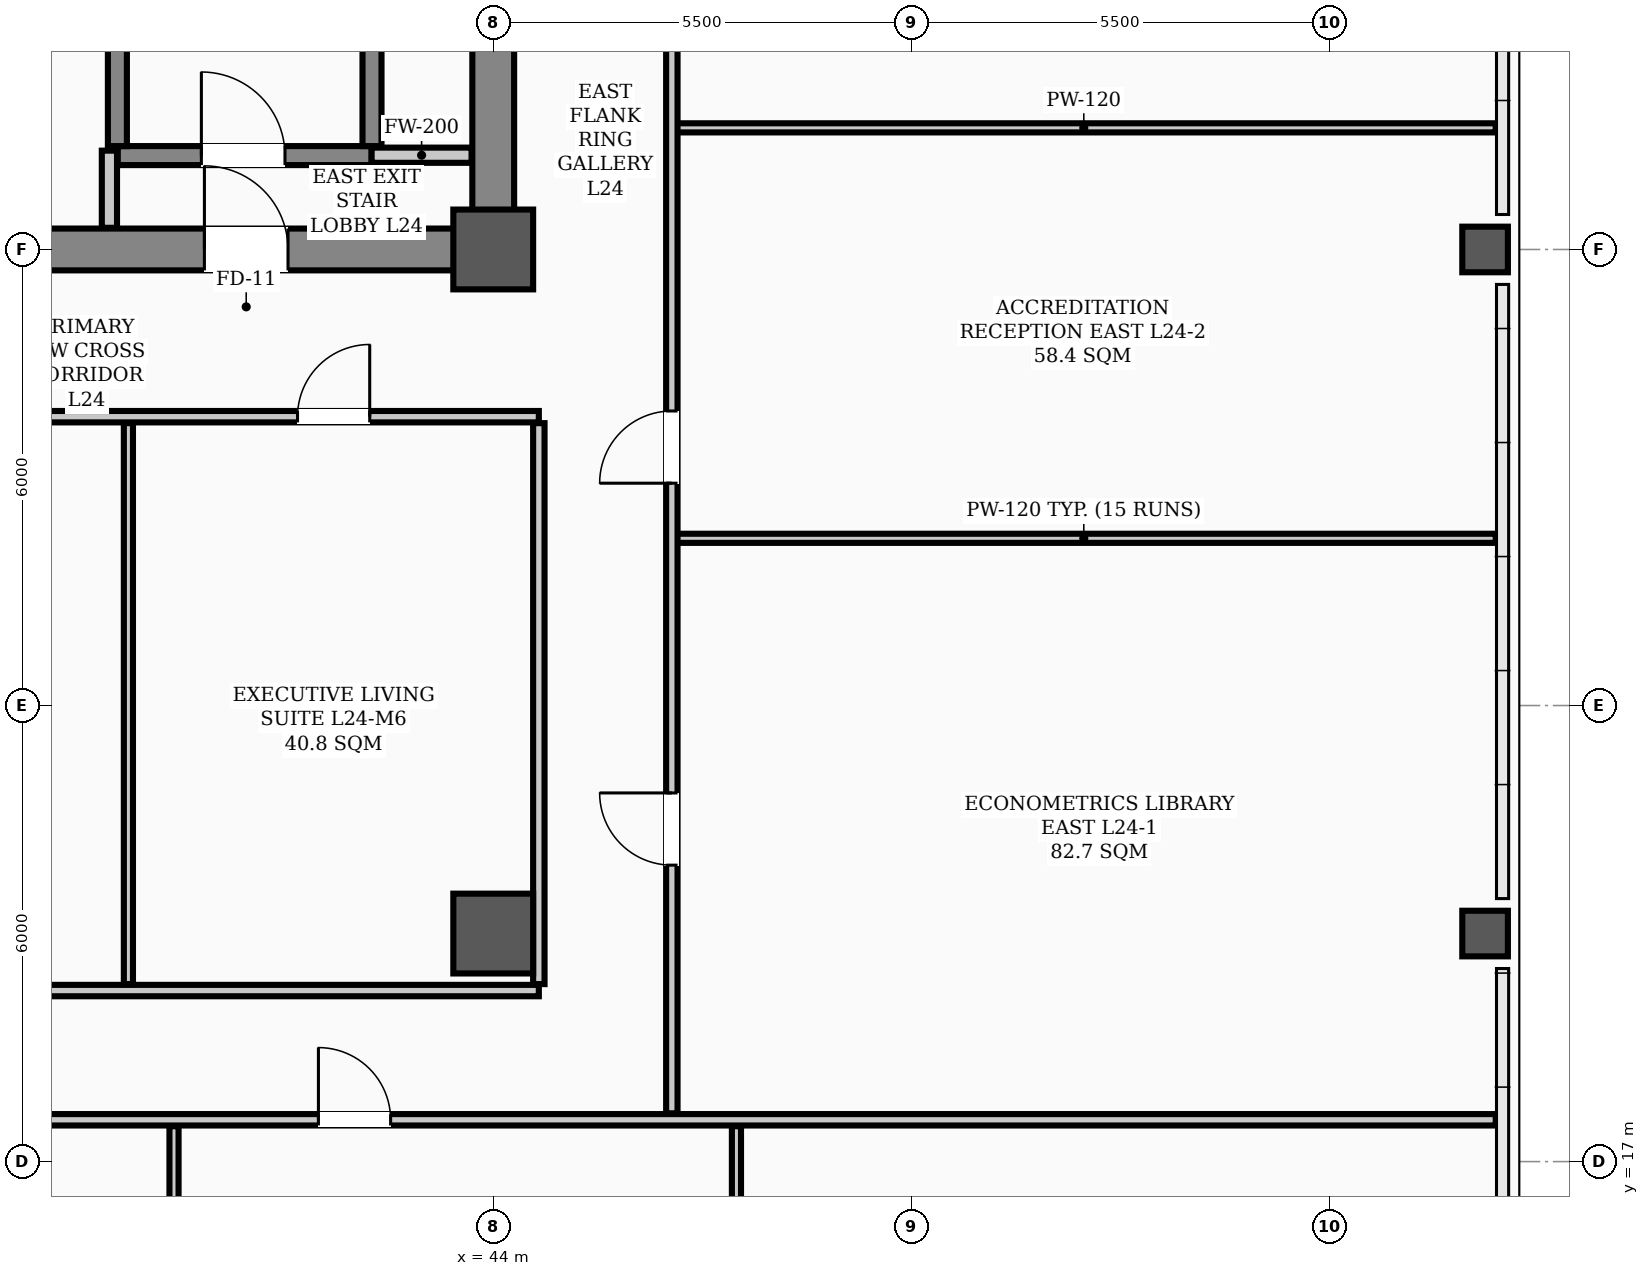
"""IFC4 building model, lengths in metres.
Left out: names, types, materials, properties, quantities, classifications, styles, units other than length and angle.
Written with IfcOpenShell. Run it as: python <this file> out.ifc"""

import sys

from ifc_helpers import new_model, si_unit, direction, frame, frame_2d, origin, origin_2d, place, context, subcontext, project, spatial, rectangle, hollow_rectangle, extrude, element, fill, save


model = new_model("IFC4")
c1 = context("Model", 3, precision=1e-05, world=origin(), true_north=direction((0.0, 1.0)))
c2 = subcontext(c1, "Body", "Model", "MODEL_VIEW")
j1 = project(units=[si_unit("LENGTHUNIT", "METRE"), si_unit("PLANEANGLEUNIT", "RADIAN")], contexts=[c1])
p1 = place(None, origin())
s1 = spatial("IfcSite", under=j1, at=p1, CompositionType="ELEMENT")
p2 = place(p1, origin())
s2 = spatial("IfcBuilding", under=s1, at=p2, CompositionType="ELEMENT")
p3 = place(p2, frame((0.0, 0.0, 96.7)))
s3 = spatial("IfcBuildingStorey", under=s2, at=p3, CompositionType="ELEMENT", Elevation=96.7)
for number, where, z_axis, x_axis in (
    (1, (44.0, 29.0, 0.0), (0.0, 0.0, 1.0), (1.0, 0.0, 0.0)),
    (2, (44.0, 20.0, 0.0), (0.0, 0.0, 1.0), (1.0, 0.0, 0.0)),
):
    element("IfcColumn", number, at=place(p3, frame(where, z_axis=z_axis, x_axis=x_axis)), inside=s3, PredefinedType="COLUMN", context=c2, shape_type="SweptSolid", body=[
        extrude(hollow_rectangle(XDim=1.05, YDim=1.05, WallThickness=0.038, InnerFilletRadius=0.019, OuterFilletRadius=0.057, at=origin_2d()), origin(), (0.0, 0.0, 1.0), 3.9),
    ])
for number, where, z_axis, x_axis in (
    (3, (57.05, 20.0, 0.0), (0.0, 0.0, 1.0), (1.0, 0.0, 0.0)),
    (4, (57.05, 29.0, 0.0), (0.0, 0.0, 1.0), (1.0, 0.0, 0.0)),
):
    element("IfcColumn", number, at=place(p3, frame(where, z_axis=z_axis, x_axis=x_axis)), inside=s3, PredefinedType="COLUMN", context=c2, shape_type="SweptSolid", body=[
        extrude(hollow_rectangle(XDim=0.6, YDim=0.6, WallThickness=0.026, InnerFilletRadius=0.013, OuterFilletRadius=0.039, at=origin_2d()), origin(), (0.0, 0.0, 1.0), 3.9),
    ])
p4 = place(p3, frame((13.5, 29.0, 0.0), z_axis=(0.0, 0.0, 1.0), x_axis=(1.0, 0.0, 0.0)))
e5 = element("IfcWall", 5, at=p4, inside=s3, PredefinedType="SHEAR", context=c2, shape_type="SweptSolid", body=[
    extrude(rectangle(XDim=30.5, YDim=0.55, at=frame_2d((15.25, 0.0))), origin(), (0.0, 0.0, 1.0), 3.6),
])
p5 = place(p4, frame((1.75, 0.0, 0.0)))
e6 = element("IfcOpeningElement", 6, at=p5, cuts=e5, PredefinedType="OPENING", context=c2, shape_type="SweptSolid", body=[
    extrude(rectangle(XDim=1.1, YDim=2.08, at=frame_2d((0.55, 1.04))), frame((0.0, 0.285, 0.0), z_axis=(0.0, -1.0, 0.0), x_axis=(1.0, 0.0, 0.0)), (0.0, 0.0, 1.0), 0.57),
])
p6 = place(p4, frame((26.7, 0.0, 0.0)))
e7 = element("IfcOpeningElement", 7, at=p6, cuts=e5, PredefinedType="OPENING", context=c2, shape_type="SweptSolid", body=[
    extrude(rectangle(XDim=1.1, YDim=2.08, at=frame_2d((0.55, 1.04))), frame((0.0, 0.285, 0.0), z_axis=(0.0, -1.0, 0.0), x_axis=(1.0, 0.0, 0.0)), (0.0, 0.0, 1.0), 0.57),
])
p7 = place(p4, frame((6.8, 0.0, 0.0)))
e8 = element("IfcOpeningElement", 8, at=p7, cuts=e5, PredefinedType="OPENING", context=c2, shape_type="SweptSolid", body=[
    extrude(rectangle(XDim=1.1, YDim=2.08, at=frame_2d((0.55, 1.04))), frame((0.0, 0.285, 0.0), z_axis=(0.0, -1.0, 0.0), x_axis=(1.0, 0.0, 0.0)), (0.0, 0.0, 1.0), 0.57),
])
p8 = place(p4, frame((13.2, 0.0, 0.0)))
e9 = element("IfcOpeningElement", 9, at=p8, cuts=e5, PredefinedType="OPENING", context=c2, shape_type="SweptSolid", body=[
    extrude(rectangle(XDim=1.6, YDim=2.08, at=frame_2d((0.8, 1.04))), frame((0.0, 0.285, 0.0), z_axis=(0.0, -1.0, 0.0), x_axis=(1.0, 0.0, 0.0)), (0.0, 0.0, 1.0), 0.57),
])
p9 = place(p4, frame((19.53, 0.0, 0.0)))
e10 = element("IfcOpeningElement", 10, at=p9, cuts=e5, PredefinedType="OPENING", context=c2, shape_type="SweptSolid", body=[
    extrude(rectangle(XDim=0.9, YDim=2.08, at=frame_2d((0.45, 1.04))), frame((0.0, 0.285, 0.0), z_axis=(0.0, -1.0, 0.0), x_axis=(1.0, 0.0, 0.0)), (0.0, 0.0, 1.0), 0.57),
])
p10 = place(p4, frame((21.57, 0.0, 0.0)))
e11 = element("IfcOpeningElement", 11, at=p10, cuts=e5, PredefinedType="OPENING", context=c2, shape_type="SweptSolid", body=[
    extrude(rectangle(XDim=0.9, YDim=2.08, at=frame_2d((0.45, 1.04))), frame((0.0, 0.285, 0.0), z_axis=(0.0, -1.0, 0.0), x_axis=(1.0, 0.0, 0.0)), (0.0, 0.0, 1.0), 0.57),
])
p11 = place(p3, frame((44.0, 29.35, 0.0), z_axis=(0.0, 0.0, 1.0), x_axis=(0.0, 1.0, 0.0)))
e12 = element("IfcWall", 12, at=p11, inside=s3, PredefinedType="SHEAR", context=c2, shape_type="SweptSolid", body=[
    extrude(rectangle(XDim=8.6, YDim=0.55, at=frame_2d((4.3, 0.0))), origin(), (0.0, 0.0, 1.0), 3.6),
])
p12 = place(p3, frame((39.06, 30.235, 0.0), z_axis=(0.0, 0.0, 1.0), x_axis=(1.0, 0.0, 0.0)))
e13 = element("IfcWall", 13, at=p12, inside=s3, PredefinedType="STANDARD", context=c2, shape_type="SweptSolid", body=[
    extrude(rectangle(XDim=3.34, YDim=0.25, at=frame_2d((1.67, 0.0))), origin(), (0.0, 0.0, 1.0), 3.6),
])
p13 = place(p12, frame((1.1, 0.0, 0.0)))
e14 = element("IfcOpeningElement", 14, at=p13, cuts=e13, PredefinedType="OPENING", context=c2, shape_type="SweptSolid", body=[
    extrude(rectangle(XDim=1.1, YDim=2.08, at=frame_2d((0.55, 1.04))), frame((0.0, 0.135, 0.0), z_axis=(0.0, -1.0, 0.0), x_axis=(1.0, 0.0, 0.0)), (0.0, 0.0, 1.0), 0.27),
])
for number, where, z_axis, x_axis in (
    (15, (39.055, 30.36, 0.0), (0.0, 0.0, 1.0), (0.0, 1.0, 0.0)),
    (16, (42.405, 30.36, 0.0), (0.0, 0.0, 1.0), (0.0, 1.0, 0.0)),
):
    element("IfcWall", number, at=place(p3, frame(where, z_axis=z_axis, x_axis=x_axis)), inside=s3, PredefinedType="STANDARD", context=c2, shape_type="SweptSolid", body=[
        extrude(rectangle(XDim=7.184, YDim=0.25, at=frame_2d((3.592, 0.0))), origin(), (0.0, 0.0, 1.0), 3.6),
    ])
p14 = place(p3, frame((42.4, 30.24, 0.0), z_axis=(0.0, 0.0, 1.0), x_axis=(1.0, 0.0, 0.0)))
e17 = element("IfcWall", 17, at=p14, inside=s3, PredefinedType="STANDARD", context=c2, shape_type="SweptSolid", body=[
    extrude(rectangle(XDim=1.315, YDim=0.2, at=frame_2d((0.658, 0.0))), origin(), (0.0, 0.0, 1.0), 2.18),
])
p15 = place(p3, frame((12.9, 26.8, 0.0), z_axis=(0.0, 0.0, 1.0), x_axis=(1.0, 0.0, 0.0)))
e18 = element("IfcWall", 18, at=p15, inside=s3, PredefinedType="PARTITIONING", context=c2, shape_type="SweptSolid", body=[
    extrude(rectangle(XDim=31.7, YDim=0.15, at=frame_2d((15.85, 0.0))), origin(), (0.0, 0.0, 1.0), 2.18),
])
p16 = place(p15, frame((13.6, 0.0, 0.0)))
e19 = element("IfcOpeningElement", 19, at=p16, cuts=e18, PredefinedType="OPENING", context=c2, shape_type="SweptSolid", body=[
    extrude(rectangle(XDim=1.6, YDim=2.08, at=frame_2d((0.8, 1.04))), frame((0.0, 0.085, 0.0), z_axis=(0.0, -1.0, 0.0), x_axis=(1.0, 0.0, 0.0)), (0.0, 0.0, 1.0), 0.17),
])
p17 = place(p15, frame((2.075, 0.0, 0.0)))
e20 = element("IfcOpeningElement", 20, at=p17, cuts=e18, PredefinedType="OPENING", context=c2, shape_type="SweptSolid", body=[
    extrude(rectangle(XDim=0.95, YDim=2.08, at=frame_2d((0.475, 1.04))), frame((0.0, 0.085, 0.0), z_axis=(0.0, -1.0, 0.0), x_axis=(1.0, 0.0, 0.0)), (0.0, 0.0, 1.0), 0.17),
])
p18 = place(p15, frame((6.925, 0.0, 0.0)))
e21 = element("IfcOpeningElement", 21, at=p18, cuts=e18, PredefinedType="OPENING", context=c2, shape_type="SweptSolid", body=[
    extrude(rectangle(XDim=0.95, YDim=2.08, at=frame_2d((0.475, 1.04))), frame((0.0, 0.085, 0.0), z_axis=(0.0, -1.0, 0.0), x_axis=(1.0, 0.0, 0.0)), (0.0, 0.0, 1.0), 0.17),
])
p19 = place(p15, frame((11.025, 0.0, 0.0)))
e22 = element("IfcOpeningElement", 22, at=p19, cuts=e18, PredefinedType="OPENING", context=c2, shape_type="SweptSolid", body=[
    extrude(rectangle(XDim=0.95, YDim=2.08, at=frame_2d((0.475, 1.04))), frame((0.0, 0.085, 0.0), z_axis=(0.0, -1.0, 0.0), x_axis=(1.0, 0.0, 0.0)), (0.0, 0.0, 1.0), 0.17),
])
p20 = place(p15, frame((16.075, 0.0, 0.0)))
e23 = element("IfcOpeningElement", 23, at=p20, cuts=e18, PredefinedType="OPENING", context=c2, shape_type="SweptSolid", body=[
    extrude(rectangle(XDim=0.95, YDim=2.08, at=frame_2d((0.475, 1.04))), frame((0.0, 0.085, 0.0), z_axis=(0.0, -1.0, 0.0), x_axis=(1.0, 0.0, 0.0)), (0.0, 0.0, 1.0), 0.17),
])
p21 = place(p15, frame((22.025, 0.0, 0.0)))
e24 = element("IfcOpeningElement", 24, at=p21, cuts=e18, PredefinedType="OPENING", context=c2, shape_type="SweptSolid", body=[
    extrude(rectangle(XDim=0.95, YDim=2.08, at=frame_2d((0.475, 1.04))), frame((0.0, 0.085, 0.0), z_axis=(0.0, -1.0, 0.0), x_axis=(1.0, 0.0, 0.0)), (0.0, 0.0, 1.0), 0.17),
])
p22 = place(p15, frame((28.525, 0.0, 0.0)))
e25 = element("IfcOpeningElement", 25, at=p22, cuts=e18, PredefinedType="OPENING", context=c2, shape_type="SweptSolid", body=[
    extrude(rectangle(XDim=0.95, YDim=2.08, at=frame_2d((0.475, 1.04))), frame((0.0, 0.085, 0.0), z_axis=(0.0, -1.0, 0.0), x_axis=(1.0, 0.0, 0.0)), (0.0, 0.0, 1.0), 0.17),
])
p23 = place(p3, frame((7.81, 17.55, 0.0), z_axis=(0.0, 0.0, 1.0), x_axis=(1.0, 0.0, 0.0)))
e26 = element("IfcWall", 26, at=p23, inside=s3, PredefinedType="PARTITIONING", context=c2, shape_type="SweptSolid", body=[
    extrude(rectangle(XDim=49.38, YDim=0.15, at=frame_2d((24.69, 0.0))), origin(), (0.0, 0.0, 1.0), 2.18),
])
p24 = place(p23, frame((3.59, 0.0, 0.0)))
e27 = element("IfcOpeningElement", 27, at=p24, cuts=e26, PredefinedType="OPENING", context=c2, shape_type="SweptSolid", body=[
    extrude(rectangle(XDim=0.95, YDim=2.08, at=frame_2d((0.475, 1.04))), frame((0.0, 0.085, 0.0), z_axis=(0.0, -1.0, 0.0), x_axis=(1.0, 0.0, 0.0)), (0.0, 0.0, 1.0), 0.17),
])
p25 = place(p23, frame((10.115, 0.0, 0.0)))
e28 = element("IfcOpeningElement", 28, at=p25, cuts=e26, PredefinedType="OPENING", context=c2, shape_type="SweptSolid", body=[
    extrude(rectangle(XDim=0.95, YDim=2.08, at=frame_2d((0.475, 1.04))), frame((0.0, 0.085, 0.0), z_axis=(0.0, -1.0, 0.0), x_axis=(1.0, 0.0, 0.0)), (0.0, 0.0, 1.0), 0.17),
])
p26 = place(p23, frame((18.615, 0.0, 0.0)))
e29 = element("IfcOpeningElement", 29, at=p26, cuts=e26, PredefinedType="OPENING", context=c2, shape_type="SweptSolid", body=[
    extrude(rectangle(XDim=0.95, YDim=2.08, at=frame_2d((0.475, 1.04))), frame((0.0, 0.085, 0.0), z_axis=(0.0, -1.0, 0.0), x_axis=(1.0, 0.0, 0.0)), (0.0, 0.0, 1.0), 0.17),
])
p27 = place(p23, frame((27.315, 0.0, 0.0)))
e30 = element("IfcOpeningElement", 30, at=p27, cuts=e26, PredefinedType="OPENING", context=c2, shape_type="SweptSolid", body=[
    extrude(rectangle(XDim=0.95, YDim=2.08, at=frame_2d((0.475, 1.04))), frame((0.0, 0.085, 0.0), z_axis=(0.0, -1.0, 0.0), x_axis=(1.0, 0.0, 0.0)), (0.0, 0.0, 1.0), 0.17),
])
p28 = place(p23, frame((33.89, 0.0, 0.0)))
e31 = element("IfcOpeningElement", 31, at=p28, cuts=e26, PredefinedType="OPENING", context=c2, shape_type="SweptSolid", body=[
    extrude(rectangle(XDim=0.95, YDim=2.08, at=frame_2d((0.475, 1.04))), frame((0.0, 0.085, 0.0), z_axis=(0.0, -1.0, 0.0), x_axis=(1.0, 0.0, 0.0)), (0.0, 0.0, 1.0), 0.17),
])
p29 = place(p3, frame((28.4, 19.25, 0.0), z_axis=(0.0, 0.0, 1.0), x_axis=(1.0, 0.0, 0.0)))
e32 = element("IfcWall", 32, at=p29, inside=s3, PredefinedType="PARTITIONING", context=c2, shape_type="SweptSolid", body=[
    extrude(rectangle(XDim=16.2, YDim=0.15, at=frame_2d((8.1, 0.0))), origin(), (0.0, 0.0, 1.0), 2.18),
])
for number, where, z_axis, x_axis in (
    (33, (46.35, 25.2, 0.0), (0.0, 0.0, 1.0), (1.0, 0.0, 0.0)),
    (34, (46.35, 30.6, 0.0), (0.0, 0.0, 1.0), (1.0, 0.0, 0.0)),
):
    element("IfcWall", number, at=place(p3, frame(where, z_axis=z_axis, x_axis=x_axis)), inside=s3, PredefinedType="PARTITIONING", context=c2, shape_type="SweptSolid", body=[
        extrude(rectangle(XDim=10.84, YDim=0.12, at=frame_2d((5.42, 0.0))), origin(), (0.0, 0.0, 1.0), 2.18),
    ])
p30 = place(p3, frame((38.95, 29.285, 0.0), z_axis=(0.0, 0.0, 1.0), x_axis=(0.0, 1.0, 0.0)))
e35 = element("IfcWall", 35, at=p30, inside=s3, PredefinedType="STANDARD", context=c2, shape_type="SweptSolid", body=[
    extrude(rectangle(XDim=1.015, YDim=0.2, at=frame_2d((0.508, 0.0))), origin(), (0.0, 0.0, 1.0), 2.18),
])
p31 = place(p3, frame((46.35, 17.635, 0.0), z_axis=(0.0, 0.0, 1.0), x_axis=(0.0, 1.0, 0.0)))
e36 = element("IfcWall", 36, at=p31, inside=s3, PredefinedType="PARTITIONING", context=c2, shape_type="SweptSolid", body=[
    extrude(rectangle(XDim=20.58, YDim=0.15, at=frame_2d((10.29, 0.0))), origin(), (0.0, 0.0, 1.0), 2.18),
])
p32 = place(p31, frame((3.265, 0.0, 0.0)))
e37 = element("IfcOpeningElement", 37, at=p32, cuts=e36, PredefinedType="OPENING", context=c2, shape_type="SweptSolid", body=[
    extrude(rectangle(XDim=0.95, YDim=2.08, at=frame_2d((0.475, 1.04))), frame((0.0, 0.085, 0.0), z_axis=(0.0, -1.0, 0.0), x_axis=(1.0, 0.0, 0.0)), (0.0, 0.0, 1.0), 0.17),
])
p33 = place(p31, frame((8.29, 0.0, 0.0)))
e38 = element("IfcOpeningElement", 38, at=p33, cuts=e36, PredefinedType="OPENING", context=c2, shape_type="SweptSolid", body=[
    extrude(rectangle(XDim=0.95, YDim=2.08, at=frame_2d((0.475, 1.04))), frame((0.0, 0.085, 0.0), z_axis=(0.0, -1.0, 0.0), x_axis=(1.0, 0.0, 0.0)), (0.0, 0.0, 1.0), 0.17),
])
p34 = place(p31, frame((16.34, 0.0, 0.0)))
e39 = element("IfcOpeningElement", 39, at=p34, cuts=e36, PredefinedType="OPENING", context=c2, shape_type="SweptSolid", body=[
    extrude(rectangle(XDim=0.95, YDim=2.08, at=frame_2d((0.475, 1.04))), frame((0.0, 0.085, 0.0), z_axis=(0.0, -1.0, 0.0), x_axis=(1.0, 0.0, 0.0)), (0.0, 0.0, 1.0), 0.17),
])
p35 = place(p3, frame((44.6, 19.335, 0.0), z_axis=(0.0, 0.0, 1.0), x_axis=(0.0, 1.0, 0.0)))
e40 = element("IfcWall", 40, at=p35, inside=s3, PredefinedType="PARTITIONING", context=c2, shape_type="SweptSolid", body=[
    extrude(rectangle(XDim=7.38, YDim=0.15, at=frame_2d((3.69, 0.0))), origin(), (0.0, 0.0, 1.0), 2.18),
])
p36 = place(p3, frame((39.8, 9.81, 0.0), z_axis=(0.0, 0.0, 1.0), x_axis=(0.0, 1.0, 0.0)))
e41 = element("IfcWall", 41, at=p36, inside=s3, PredefinedType="PARTITIONING", context=c2, shape_type="SweptSolid", body=[
    extrude(rectangle(XDim=7.655, YDim=0.12, at=frame_2d((3.828, 0.0))), origin(), (0.0, 0.0, 1.0), 2.18),
])
p37 = place(p3, frame((47.2, 9.81, 0.0), z_axis=(0.0, 0.0, 1.0), x_axis=(0.0, 1.0, 0.0)))
e42 = element("IfcWall", 42, at=p37, inside=s3, PredefinedType="PARTITIONING", context=c2, shape_type="SweptSolid", body=[
    extrude(rectangle(XDim=7.655, YDim=0.12, at=frame_2d((3.828, 0.0))), origin(), (0.0, 0.0, 1.0), 3.6),
])
p38 = place(p37, frame((3.395, 0.0, 0.0)))
e43 = element("IfcOpeningElement", 43, at=p38, cuts=e42, PredefinedType="OPENING", context=c2, shape_type="SweptSolid", body=[
    extrude(rectangle(XDim=0.95, YDim=2.08, at=frame_2d((0.475, 1.04))), frame((0.0, 0.07, 0.0), z_axis=(0.0, -1.0, 0.0), x_axis=(1.0, 0.0, 0.0)), (0.0, 0.0, 1.0), 0.14),
])
p39 = place(p3, frame((39.2, 19.335, 0.0), z_axis=(0.0, 0.0, 1.0), x_axis=(0.0, 1.0, 0.0)))
e44 = element("IfcWall", 44, at=p39, inside=s3, PredefinedType="PARTITIONING", context=c2, shape_type="SweptSolid", body=[
    extrude(rectangle(XDim=7.38, YDim=0.12, at=frame_2d((3.69, 0.0))), origin(), (0.0, 0.0, 1.0), 2.18),
])
p40 = place(p13, origin())
e45 = element("IfcDoor", 45, at=p40, inside=s3, OperationType="SINGLE_SWING_LEFT", PredefinedType="DOOR", context=c2, shape_type="SweptSolid", body=[
    extrude(rectangle(XDim=1.1, YDim=2.08, at=frame_2d((0.55, 1.04))), frame((0.0, 0.025, 0.0), z_axis=(0.0, -1.0, 0.0), x_axis=(1.0, 0.0, 0.0)), (0.0, 0.0, 1.0), 0.05),
])
fill(e14, e45)
p41 = place(p6, origin())
e46 = element("IfcDoor", 46, at=p41, inside=s3, OperationType="SINGLE_SWING_LEFT", PredefinedType="DOOR", context=c2, shape_type="SweptSolid", body=[
    extrude(rectangle(XDim=1.1, YDim=2.08, at=frame_2d((0.55, 1.04))), frame((0.0, 0.025, 0.0), z_axis=(0.0, -1.0, 0.0), x_axis=(1.0, 0.0, 0.0)), (0.0, 0.0, 1.0), 0.05),
])
fill(e7, e46)
p42 = place(p28, origin())
e47 = element("IfcDoor", 47, at=p42, inside=s3, OperationType="SINGLE_SWING_LEFT", PredefinedType="DOOR", context=c2, shape_type="SweptSolid", body=[
    extrude(rectangle(XDim=0.95, YDim=2.08, at=frame_2d((0.475, 1.04))), frame((0.0, 0.025, 0.0), z_axis=(0.0, -1.0, 0.0), x_axis=(1.0, 0.0, 0.0)), (0.0, 0.0, 1.0), 0.05),
])
fill(e31, e47)
p43 = place(p22, origin())
e48 = element("IfcDoor", 48, at=p43, inside=s3, OperationType="SINGLE_SWING_RIGHT", PredefinedType="DOOR", context=c2, shape_type="SweptSolid", body=[
    extrude(rectangle(XDim=0.95, YDim=2.08, at=frame_2d((0.475, 1.04))), frame((0.0, 0.025, 0.0), z_axis=(0.0, -1.0, 0.0), x_axis=(1.0, 0.0, 0.0)), (0.0, 0.0, 1.0), 0.05),
])
fill(e25, e48)
p44 = place(p32, origin())
e49 = element("IfcDoor", 49, at=p44, inside=s3, OperationType="SINGLE_SWING_RIGHT", PredefinedType="DOOR", context=c2, shape_type="SweptSolid", body=[
    extrude(rectangle(XDim=0.95, YDim=2.08, at=frame_2d((0.475, 1.04))), frame((0.0, 0.025, 0.0), z_axis=(0.0, -1.0, 0.0), x_axis=(1.0, 0.0, 0.0)), (0.0, 0.0, 1.0), 0.05),
])
fill(e37, e49)
p45 = place(p33, origin())
e50 = element("IfcDoor", 50, at=p45, inside=s3, OperationType="SINGLE_SWING_LEFT", PredefinedType="DOOR", context=c2, shape_type="SweptSolid", body=[
    extrude(rectangle(XDim=0.95, YDim=2.08, at=frame_2d((0.475, 1.04))), frame((0.0, 0.025, 0.0), z_axis=(0.0, -1.0, 0.0), x_axis=(1.0, 0.0, 0.0)), (0.0, 0.0, 1.0), 0.05),
])
fill(e38, e50)
save(model, sys.argv[1])
